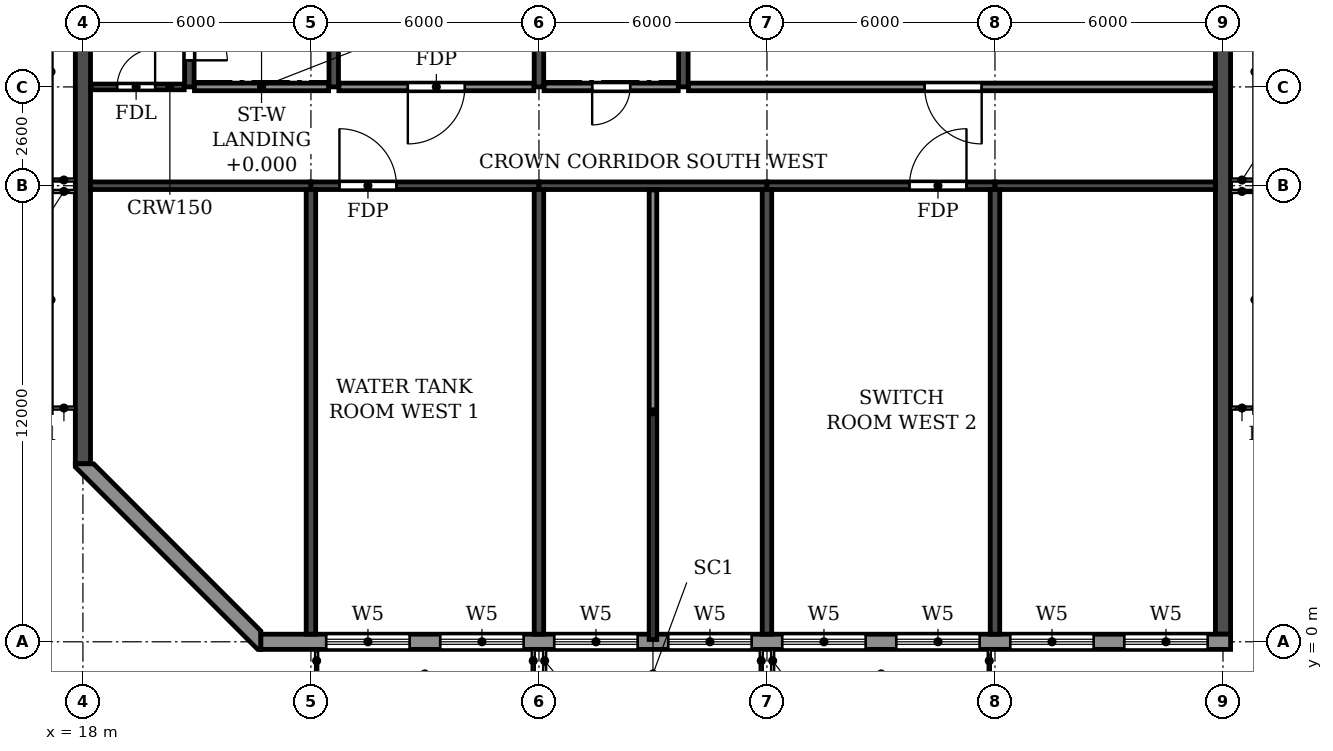
"""IFC4 building model, lengths in metres.
Left out: names, types, materials, properties, quantities, classifications, styles, units other than length and angle.
Written with IfcOpenShell. Run it as: python <this file> out.ifc"""

import sys

from ifc_helpers import new_model, si_unit, direction, frame, frame_2d, origin, place, context, subcontext, project, spatial, polyline, rectangle, outline, extrude, element, fill, save


model = new_model("IFC4")
c1 = context("Model", 3, precision=1e-05, world=origin(), true_north=direction((0.0, 1.0)))
c2 = subcontext(c1, "Body", "Model", "MODEL_VIEW")
j1 = project(units=[si_unit("LENGTHUNIT", "METRE"), si_unit("PLANEANGLEUNIT", "RADIAN")], contexts=[c1])
p1 = place(None, origin())
s1 = spatial("IfcSite", under=j1, at=p1, CompositionType="ELEMENT")
p2 = place(p1, origin())
s2 = spatial("IfcBuilding", under=s1, at=p2, CompositionType="ELEMENT")
p3 = place(p2, frame((0.0, 0.0, 279.0)))
s3 = spatial("IfcBuildingStorey", under=s2, at=p3, CompositionType="ELEMENT", Elevation=279.0)
for number, where, z_axis, x_axis in (
    (1, (24.0, 0.2, 0.0), (0.0, 0.0, 1.0), (0.0, 1.0, 0.0)),
    (2, (30.0, 0.2, 0.0), (0.0, 0.0, 1.0), (0.0, 1.0, 0.0)),
    (3, (36.0, 0.2, 0.0), (0.0, 0.0, 1.0), (0.0, 1.0, 0.0)),
    (4, (42.0, 0.2, 0.0), (0.0, 0.0, 1.0), (0.0, 1.0, 0.0)),
):
    element("IfcWall", number, at=place(p3, frame(where, z_axis=z_axis, x_axis=x_axis)), inside=s3, PredefinedType="SHEAR", context=c2, shape_type="SweptSolid", body=[
        extrude(rectangle(XDim=11.7, YDim=0.25, at=frame_2d((5.85, 0.0))), origin(), (0.0, 0.0, 1.0), 3.05),
    ])
p4 = place(p3, frame((18.0, 4.683, 0.0), z_axis=(0.0, 0.0, 1.0), x_axis=(0.0, 1.0, 0.0)))
e5 = element("IfcWall", 5, at=p4, inside=s3, PredefinedType="SHEAR", context=c2, shape_type="SweptSolid", body=[
    extrude(rectangle(XDim=31.834, YDim=0.4, at=frame_2d((15.917, 0.0))), origin(), (0.0, 0.0, 1.0), 3.05),
])
p5 = place(p3, frame((48.0, 0.2, 0.0), z_axis=(0.0, 0.0, 1.0), x_axis=(0.0, 1.0, 0.0)))
e6 = element("IfcWall", 6, at=p5, inside=s3, PredefinedType="SHEAR", context=c2, shape_type="SweptSolid", body=[
    extrude(rectangle(XDim=40.8, YDim=0.4, at=frame_2d((20.4, 0.0))), origin(), (0.0, 0.0, 1.0), 3.05),
])
p6 = place(p3, frame((18.2, 12.0, 0.0), z_axis=(0.0, 0.0, 1.0), x_axis=(1.0, 0.0, 0.0)))
e7 = element("IfcWall", 7, at=p6, inside=s3, PredefinedType="SHEAR", context=c2, shape_type="SweptSolid", body=[
    extrude(rectangle(XDim=5.8, YDim=0.2, at=frame_2d((2.9, 0.0))), origin(), (0.0, 0.0, 1.0), 2.45),
])
p7 = place(p3, frame((24.0, 12.0, 0.0), z_axis=(0.0, 0.0, 1.0), x_axis=(1.0, 0.0, 0.0)))
e8 = element("IfcWall", 8, at=p7, inside=s3, PredefinedType="SHEAR", context=c2, shape_type="SweptSolid", body=[
    extrude(rectangle(XDim=6.0, YDim=0.2, at=frame_2d((3.0, 0.0))), origin(), (0.0, 0.0, 1.0), 2.45),
])
p8 = place(p7, frame((0.75, 0.0, 0.0)))
e9 = element("IfcOpeningElement", 9, at=p8, cuts=e8, PredefinedType="OPENING", context=c2, shape_type="SweptSolid", body=[
    extrude(rectangle(XDim=1.5, YDim=2.1, at=frame_2d((0.75, 1.05))), frame((0.0, 0.11, 0.0), z_axis=(0.0, -1.0, 0.0), x_axis=(1.0, 0.0, 0.0)), (0.0, 0.0, 1.0), 0.22),
])
p9 = place(p3, frame((30.0, 12.0, 0.0), z_axis=(0.0, 0.0, 1.0), x_axis=(1.0, 0.0, 0.0)))
e10 = element("IfcWall", 10, at=p9, inside=s3, PredefinedType="SHEAR", context=c2, shape_type="SweptSolid", body=[
    extrude(rectangle(XDim=6.0, YDim=0.2, at=frame_2d((3.0, 0.0))), origin(), (0.0, 0.0, 1.0), 2.45),
])
p10 = place(p3, frame((36.0, 12.0, 0.0), z_axis=(0.0, 0.0, 1.0), x_axis=(1.0, 0.0, 0.0)))
e11 = element("IfcWall", 11, at=p10, inside=s3, PredefinedType="SHEAR", context=c2, shape_type="SweptSolid", body=[
    extrude(rectangle(XDim=6.0, YDim=0.2, at=frame_2d((3.0, 0.0))), origin(), (0.0, 0.0, 1.0), 2.45),
])
p11 = place(p10, frame((3.75, 0.0, 0.0)))
e12 = element("IfcOpeningElement", 12, at=p11, cuts=e11, PredefinedType="OPENING", context=c2, shape_type="SweptSolid", body=[
    extrude(rectangle(XDim=1.5, YDim=2.1, at=frame_2d((0.75, 1.05))), frame((0.0, 0.11, 0.0), z_axis=(0.0, -1.0, 0.0), x_axis=(1.0, 0.0, 0.0)), (0.0, 0.0, 1.0), 0.22),
])
p12 = place(p3, frame((42.0, 12.0, 0.0), z_axis=(0.0, 0.0, 1.0), x_axis=(1.0, 0.0, 0.0)))
e13 = element("IfcWall", 13, at=p12, inside=s3, PredefinedType="SHEAR", context=c2, shape_type="SweptSolid", body=[
    extrude(rectangle(XDim=5.8, YDim=0.2, at=frame_2d((2.9, 0.0))), origin(), (0.0, 0.0, 1.0), 2.45),
])
p13 = place(p3, frame((20.8, 14.6, 0.0), z_axis=(0.0, 0.0, 1.0), x_axis=(0.0, 1.0, 0.0)))
e14 = element("IfcWall", 14, at=p13, inside=s3, PredefinedType="SOLIDWALL", context=c2, shape_type="SweptSolid", body=[
    extrude(rectangle(XDim=7.875, YDim=0.25, at=frame_2d((3.938, 0.0))), origin(), (0.0, 0.0, 1.0), 3.05),
])
p14 = place(p13, frame((0.7, 0.0, 0.0)))
e15 = element("IfcOpeningElement", 15, at=p14, cuts=e14, PredefinedType="OPENING", context=c2, shape_type="SweptSolid", body=[
    extrude(rectangle(XDim=1.0, YDim=2.1, at=frame_2d((0.5, 1.05))), frame((0.0, 0.135, 0.0), z_axis=(0.0, -1.0, 0.0), x_axis=(1.0, 0.0, 0.0)), (0.0, 0.0, 1.0), 0.27),
])
for number, where, z_axis, x_axis in (
    (16, (24.6, 14.6, 0.0), (0.0, 0.0, 1.0), (0.0, 1.0, 0.0)),
    (17, (30.0, 14.6, 0.0), (0.0, 0.0, 1.0), (0.0, 1.0, 0.0)),
    (18, (33.8, 14.6, 0.0), (0.0, 0.0, 1.0), (0.0, 1.0, 0.0)),
):
    element("IfcWall", number, at=place(p3, frame(where, z_axis=z_axis, x_axis=x_axis)), inside=s3, PredefinedType="SOLIDWALL", context=c2, shape_type="SweptSolid", body=[
        extrude(rectangle(XDim=7.875, YDim=0.25, at=frame_2d((3.938, 0.0))), origin(), (0.0, 0.0, 1.0), 3.05),
    ])
p15 = place(p3, frame((22.683, 0.0, 0.0), z_axis=(0.0, 0.0, 1.0), x_axis=(1.0, 0.0, 0.0)))
e19 = element("IfcWall", 19, at=p15, inside=s3, PredefinedType="STANDARD", context=c2, shape_type="SweptSolid", body=[
    extrude(rectangle(XDim=25.517, YDim=0.4, at=frame_2d((12.759, 0.0))), origin(), (0.0, 0.0, 1.0), 3.05),
])
p16 = place(p15, frame((1.717, 0.0, 0.6)))
e20 = element("IfcOpeningElement", 20, at=p16, cuts=e19, PredefinedType="OPENING", context=c2, shape_type="SweptSolid", body=[
    extrude(rectangle(XDim=2.2, YDim=2.4, at=frame_2d((1.1, 1.2))), frame((0.0, 0.21, 0.0), z_axis=(0.0, -1.0, 0.0), x_axis=(1.0, 0.0, 0.0)), (0.0, 0.0, 1.0), 0.42),
])
p17 = place(p15, frame((4.717, 0.0, 0.6)))
e21 = element("IfcOpeningElement", 21, at=p17, cuts=e19, PredefinedType="OPENING", context=c2, shape_type="SweptSolid", body=[
    extrude(rectangle(XDim=2.2, YDim=2.4, at=frame_2d((1.1, 1.2))), frame((0.0, 0.21, 0.0), z_axis=(0.0, -1.0, 0.0), x_axis=(1.0, 0.0, 0.0)), (0.0, 0.0, 1.0), 0.42),
])
p18 = place(p15, frame((7.717, 0.0, 0.6)))
e22 = element("IfcOpeningElement", 22, at=p18, cuts=e19, PredefinedType="OPENING", context=c2, shape_type="SweptSolid", body=[
    extrude(rectangle(XDim=2.2, YDim=2.4, at=frame_2d((1.1, 1.2))), frame((0.0, 0.21, 0.0), z_axis=(0.0, -1.0, 0.0), x_axis=(1.0, 0.0, 0.0)), (0.0, 0.0, 1.0), 0.42),
])
p19 = place(p15, frame((10.717, 0.0, 0.6)))
e23 = element("IfcOpeningElement", 23, at=p19, cuts=e19, PredefinedType="OPENING", context=c2, shape_type="SweptSolid", body=[
    extrude(rectangle(XDim=2.2, YDim=2.4, at=frame_2d((1.1, 1.2))), frame((0.0, 0.21, 0.0), z_axis=(0.0, -1.0, 0.0), x_axis=(1.0, 0.0, 0.0)), (0.0, 0.0, 1.0), 0.42),
])
p20 = place(p15, frame((13.717, 0.0, 0.6)))
e24 = element("IfcOpeningElement", 24, at=p20, cuts=e19, PredefinedType="OPENING", context=c2, shape_type="SweptSolid", body=[
    extrude(rectangle(XDim=2.2, YDim=2.4, at=frame_2d((1.1, 1.2))), frame((0.0, 0.21, 0.0), z_axis=(0.0, -1.0, 0.0), x_axis=(1.0, 0.0, 0.0)), (0.0, 0.0, 1.0), 0.42),
])
p21 = place(p15, frame((16.717, 0.0, 0.6)))
e25 = element("IfcOpeningElement", 25, at=p21, cuts=e19, PredefinedType="OPENING", context=c2, shape_type="SweptSolid", body=[
    extrude(rectangle(XDim=2.2, YDim=2.4, at=frame_2d((1.1, 1.2))), frame((0.0, 0.21, 0.0), z_axis=(0.0, -1.0, 0.0), x_axis=(1.0, 0.0, 0.0)), (0.0, 0.0, 1.0), 0.42),
])
p22 = place(p15, frame((19.717, 0.0, 0.6)))
e26 = element("IfcOpeningElement", 26, at=p22, cuts=e19, PredefinedType="OPENING", context=c2, shape_type="SweptSolid", body=[
    extrude(rectangle(XDim=2.2, YDim=2.4, at=frame_2d((1.1, 1.2))), frame((0.0, 0.21, 0.0), z_axis=(0.0, -1.0, 0.0), x_axis=(1.0, 0.0, 0.0)), (0.0, 0.0, 1.0), 0.42),
])
p23 = place(p15, frame((22.717, 0.0, 0.6)))
e27 = element("IfcOpeningElement", 27, at=p23, cuts=e19, PredefinedType="OPENING", context=c2, shape_type="SweptSolid", body=[
    extrude(rectangle(XDim=2.2, YDim=2.4, at=frame_2d((1.1, 1.2))), frame((0.0, 0.21, 0.0), z_axis=(0.0, -1.0, 0.0), x_axis=(1.0, 0.0, 0.0)), (0.0, 0.0, 1.0), 0.42),
])
p24 = place(p3, origin())
e28 = element("IfcWall", 28, at=p24, inside=s3, PredefinedType="STANDARD", context=c2, shape_type="SweptSolid", body=[
    extrude(outline(polyline([(17.8, 4.683), (17.8, 4.6), (22.6, -0.2), (22.683, -0.2), (22.683, 0.283), (18.283, 4.683), (17.8, 4.683)])), origin(), (0.0, 0.0, 1.0), 3.05),
])
p25 = place(p3, frame((18.21, 14.6, 0.0), z_axis=(0.0, 0.0, 1.0), x_axis=(1.0, 0.0, 0.0)))
e29 = element("IfcWall", 29, at=p25, inside=s3, PredefinedType="PARTITIONING", context=c2, shape_type="SweptSolid", body=[
    extrude(rectangle(XDim=2.455, YDim=0.15, at=frame_2d((1.228, 0.0))), origin(), (0.0, 0.0, 1.0), 3.05),
])
p26 = place(p25, frame((0.69, 0.0, 0.0)))
e30 = element("IfcOpeningElement", 30, at=p26, cuts=e29, PredefinedType="OPENING", context=c2, shape_type="SweptSolid", body=[
    extrude(rectangle(XDim=1.0, YDim=2.1, at=frame_2d((0.5, 1.05))), frame((0.0, 0.085, 0.0), z_axis=(0.0, -1.0, 0.0), x_axis=(1.0, 0.0, 0.0)), (0.0, 0.0, 1.0), 0.17),
])
p27 = place(p3, frame((24.735, 14.6, 0.0), z_axis=(0.0, 0.0, 1.0), x_axis=(1.0, 0.0, 0.0)))
e31 = element("IfcWall", 31, at=p27, inside=s3, PredefinedType="PARTITIONING", context=c2, shape_type="SweptSolid", body=[
    extrude(rectangle(XDim=5.13, YDim=0.2, at=frame_2d((2.565, 0.0))), origin(), (0.0, 0.0, 1.0), 3.05),
])
p28 = place(p27, frame((1.815, 0.0, 0.0)))
e32 = element("IfcOpeningElement", 32, at=p28, cuts=e31, PredefinedType="OPENING", context=c2, shape_type="SweptSolid", body=[
    extrude(rectangle(XDim=1.5, YDim=2.1, at=frame_2d((0.75, 1.05))), frame((0.0, 0.11, 0.0), z_axis=(0.0, -1.0, 0.0), x_axis=(1.0, 0.0, 0.0)), (0.0, 0.0, 1.0), 0.22),
])
p29 = place(p3, frame((33.935, 14.6, 0.0), z_axis=(0.0, 0.0, 1.0), x_axis=(1.0, 0.0, 0.0)))
e33 = element("IfcWall", 33, at=p29, inside=s3, PredefinedType="PARTITIONING", context=c2, shape_type="SweptSolid", body=[
    extrude(rectangle(XDim=13.855, YDim=0.2, at=frame_2d((6.927, 0.0))), origin(), (0.0, 0.0, 1.0), 3.05),
])
p30 = place(p29, frame((6.215, 0.0, 0.0)))
e34 = element("IfcOpeningElement", 34, at=p30, cuts=e33, PredefinedType="OPENING", context=c2, shape_type="SweptSolid", body=[
    extrude(rectangle(XDim=1.5, YDim=2.1, at=frame_2d((0.75, 1.05))), frame((0.0, 0.11, 0.0), z_axis=(0.0, -1.0, 0.0), x_axis=(1.0, 0.0, 0.0)), (0.0, 0.0, 1.0), 0.22),
])
p31 = place(p3, frame((33.0, 0.06, 0.0), z_axis=(0.0, 0.0, 1.0), x_axis=(0.0, 1.0, 0.0)))
e35 = element("IfcWall", 35, at=p31, inside=s3, PredefinedType="PARTITIONING", context=c2, shape_type="SweptSolid", body=[
    extrude(rectangle(XDim=11.83, YDim=0.2, at=frame_2d((5.915, 0.0))), origin(), (0.0, 0.0, 1.0), 3.05),
])
p32 = place(p3, frame((20.935, 14.6, 0.0), z_axis=(0.0, 0.0, 1.0), x_axis=(1.0, 0.0, 0.0)))
e36 = element("IfcWall", 36, at=p32, inside=s3, PredefinedType="PARTITIONING", context=c2, shape_type="SweptSolid", body=[
    extrude(rectangle(XDim=3.53, YDim=0.2, at=frame_2d((1.765, 0.0))), origin(), (0.0, 0.0, 1.0), 3.05),
])
p33 = place(p3, frame((30.135, 14.6, 0.0), z_axis=(0.0, 0.0, 1.0), x_axis=(1.0, 0.0, 0.0)))
e37 = element("IfcWall", 37, at=p33, inside=s3, PredefinedType="PARTITIONING", context=c2, shape_type="SweptSolid", body=[
    extrude(rectangle(XDim=3.53, YDim=0.2, at=frame_2d((1.765, 0.0))), origin(), (0.0, 0.0, 1.0), 3.05),
])
p34 = place(p33, frame((1.265, 0.0, 0.0)))
e38 = element("IfcOpeningElement", 38, at=p34, cuts=e37, PredefinedType="OPENING", context=c2, shape_type="SweptSolid", body=[
    extrude(rectangle(XDim=1.0, YDim=2.1, at=frame_2d((0.5, 1.05))), frame((0.0, 0.11, 0.0), z_axis=(0.0, -1.0, 0.0), x_axis=(1.0, 0.0, 0.0)), (0.0, 0.0, 1.0), 0.22),
])
p35 = place(p16, origin())
e39 = element("IfcWindow", 39, at=p35, inside=s3, PartitioningType="TRIPLE_PANEL_HORIZONTAL", PredefinedType="WINDOW", context=c2, shape_type="SweptSolid", body=[
    extrude(rectangle(XDim=2.2, YDim=2.4, at=frame_2d((1.1, 1.2))), frame((0.0, 0.03, 0.0), z_axis=(0.0, -1.0, 0.0), x_axis=(1.0, 0.0, 0.0)), (0.0, 0.0, 1.0), 0.06),
])
fill(e20, e39)
p36 = place(p17, origin())
e40 = element("IfcWindow", 40, at=p36, inside=s3, PartitioningType="TRIPLE_PANEL_HORIZONTAL", PredefinedType="WINDOW", context=c2, shape_type="SweptSolid", body=[
    extrude(rectangle(XDim=2.2, YDim=2.4, at=frame_2d((1.1, 1.2))), frame((0.0, 0.03, 0.0), z_axis=(0.0, -1.0, 0.0), x_axis=(1.0, 0.0, 0.0)), (0.0, 0.0, 1.0), 0.06),
])
fill(e21, e40)
p37 = place(p18, origin())
e41 = element("IfcWindow", 41, at=p37, inside=s3, PartitioningType="TRIPLE_PANEL_HORIZONTAL", PredefinedType="WINDOW", context=c2, shape_type="SweptSolid", body=[
    extrude(rectangle(XDim=2.2, YDim=2.4, at=frame_2d((1.1, 1.2))), frame((0.0, 0.03, 0.0), z_axis=(0.0, -1.0, 0.0), x_axis=(1.0, 0.0, 0.0)), (0.0, 0.0, 1.0), 0.06),
])
fill(e22, e41)
p38 = place(p19, origin())
e42 = element("IfcWindow", 42, at=p38, inside=s3, PartitioningType="TRIPLE_PANEL_HORIZONTAL", PredefinedType="WINDOW", context=c2, shape_type="SweptSolid", body=[
    extrude(rectangle(XDim=2.2, YDim=2.4, at=frame_2d((1.1, 1.2))), frame((0.0, 0.03, 0.0), z_axis=(0.0, -1.0, 0.0), x_axis=(1.0, 0.0, 0.0)), (0.0, 0.0, 1.0), 0.06),
])
fill(e23, e42)
p39 = place(p20, origin())
e43 = element("IfcWindow", 43, at=p39, inside=s3, PartitioningType="TRIPLE_PANEL_HORIZONTAL", PredefinedType="WINDOW", context=c2, shape_type="SweptSolid", body=[
    extrude(rectangle(XDim=2.2, YDim=2.4, at=frame_2d((1.1, 1.2))), frame((0.0, 0.03, 0.0), z_axis=(0.0, -1.0, 0.0), x_axis=(1.0, 0.0, 0.0)), (0.0, 0.0, 1.0), 0.06),
])
fill(e24, e43)
p40 = place(p21, origin())
e44 = element("IfcWindow", 44, at=p40, inside=s3, PartitioningType="TRIPLE_PANEL_HORIZONTAL", PredefinedType="WINDOW", context=c2, shape_type="SweptSolid", body=[
    extrude(rectangle(XDim=2.2, YDim=2.4, at=frame_2d((1.1, 1.2))), frame((0.0, 0.03, 0.0), z_axis=(0.0, -1.0, 0.0), x_axis=(1.0, 0.0, 0.0)), (0.0, 0.0, 1.0), 0.06),
])
fill(e25, e44)
p41 = place(p22, origin())
e45 = element("IfcWindow", 45, at=p41, inside=s3, PartitioningType="TRIPLE_PANEL_HORIZONTAL", PredefinedType="WINDOW", context=c2, shape_type="SweptSolid", body=[
    extrude(rectangle(XDim=2.2, YDim=2.4, at=frame_2d((1.1, 1.2))), frame((0.0, 0.03, 0.0), z_axis=(0.0, -1.0, 0.0), x_axis=(1.0, 0.0, 0.0)), (0.0, 0.0, 1.0), 0.06),
])
fill(e26, e45)
p42 = place(p23, origin())
e46 = element("IfcWindow", 46, at=p42, inside=s3, PartitioningType="TRIPLE_PANEL_HORIZONTAL", PredefinedType="WINDOW", context=c2, shape_type="SweptSolid", body=[
    extrude(rectangle(XDim=2.2, YDim=2.4, at=frame_2d((1.1, 1.2))), frame((0.0, 0.03, 0.0), z_axis=(0.0, -1.0, 0.0), x_axis=(1.0, 0.0, 0.0)), (0.0, 0.0, 1.0), 0.06),
])
fill(e27, e46)
p43 = place(p8, origin())
e47 = element("IfcDoor", 47, at=p43, inside=s3, OperationType="DOUBLE_DOOR_SINGLE_SWING", PredefinedType="DOOR", context=c2, shape_type="SweptSolid", body=[
    extrude(rectangle(XDim=1.5, YDim=2.1, at=frame_2d((0.75, 1.05))), frame((0.0, 0.025, 0.0), z_axis=(0.0, -1.0, 0.0), x_axis=(1.0, 0.0, 0.0)), (0.0, 0.0, 1.0), 0.05),
])
fill(e9, e47)
p44 = place(p28, frame((1.5, 0.0, 0.0), z_axis=(0.0, 0.0, 1.0), x_axis=(-1.0, 0.0, 0.0)))
e48 = element("IfcDoor", 48, at=p44, inside=s3, OperationType="DOUBLE_DOOR_SINGLE_SWING", PredefinedType="DOOR", context=c2, shape_type="SweptSolid", body=[
    extrude(rectangle(XDim=1.5, YDim=2.1, at=frame_2d((0.75, 1.05))), frame((0.0, 0.025, 0.0), z_axis=(0.0, -1.0, 0.0), x_axis=(1.0, 0.0, 0.0)), (0.0, 0.0, 1.0), 0.05),
])
fill(e32, e48)
p45 = place(p11, origin())
e49 = element("IfcDoor", 49, at=p45, inside=s3, OperationType="DOUBLE_DOOR_SINGLE_SWING", PredefinedType="DOOR", context=c2, shape_type="SweptSolid", body=[
    extrude(rectangle(XDim=1.5, YDim=2.1, at=frame_2d((0.75, 1.05))), frame((0.0, 0.025, 0.0), z_axis=(0.0, -1.0, 0.0), x_axis=(1.0, 0.0, 0.0)), (0.0, 0.0, 1.0), 0.05),
])
fill(e12, e49)
p46 = place(p30, frame((1.5, 0.0, 0.0), z_axis=(0.0, 0.0, 1.0), x_axis=(-1.0, 0.0, 0.0)))
e50 = element("IfcDoor", 50, at=p46, inside=s3, OperationType="DOUBLE_DOOR_SINGLE_SWING", PredefinedType="DOOR", context=c2, shape_type="SweptSolid", body=[
    extrude(rectangle(XDim=1.5, YDim=2.1, at=frame_2d((0.75, 1.05))), frame((0.0, 0.025, 0.0), z_axis=(0.0, -1.0, 0.0), x_axis=(1.0, 0.0, 0.0)), (0.0, 0.0, 1.0), 0.05),
])
fill(e34, e50)
p47 = place(p26, origin())
e51 = element("IfcDoor", 51, at=p47, inside=s3, OperationType="SINGLE_SWING_RIGHT", PredefinedType="DOOR", context=c2, shape_type="SweptSolid", body=[
    extrude(rectangle(XDim=1.0, YDim=2.1, at=frame_2d((0.5, 1.05))), frame((0.0, 0.025, 0.0), z_axis=(0.0, -1.0, 0.0), x_axis=(1.0, 0.0, 0.0)), (0.0, 0.0, 1.0), 0.05),
])
fill(e30, e51)
p48 = place(p14, frame((1.0, 0.0, 0.0), z_axis=(0.0, 0.0, 1.0), x_axis=(-1.0, 0.0, 0.0)))
e52 = element("IfcDoor", 52, at=p48, inside=s3, OperationType="SINGLE_SWING_RIGHT", PredefinedType="DOOR", context=c2, shape_type="SweptSolid", body=[
    extrude(rectangle(XDim=1.0, YDim=2.1, at=frame_2d((0.5, 1.05))), frame((0.0, 0.025, 0.0), z_axis=(0.0, -1.0, 0.0), x_axis=(1.0, 0.0, 0.0)), (0.0, 0.0, 1.0), 0.05),
])
fill(e15, e52)
p49 = place(p34, frame((1.0, 0.0, 0.0), z_axis=(0.0, 0.0, 1.0), x_axis=(-1.0, 0.0, 0.0)))
e53 = element("IfcDoor", 53, at=p49, inside=s3, OperationType="SINGLE_SWING_RIGHT", PredefinedType="DOOR", context=c2, shape_type="SweptSolid", body=[
    extrude(rectangle(XDim=1.0, YDim=2.1, at=frame_2d((0.5, 1.05))), frame((0.0, 0.025, 0.0), z_axis=(0.0, -1.0, 0.0), x_axis=(1.0, 0.0, 0.0)), (0.0, 0.0, 1.0), 0.05),
])
fill(e38, e53)
save(model, sys.argv[1])
